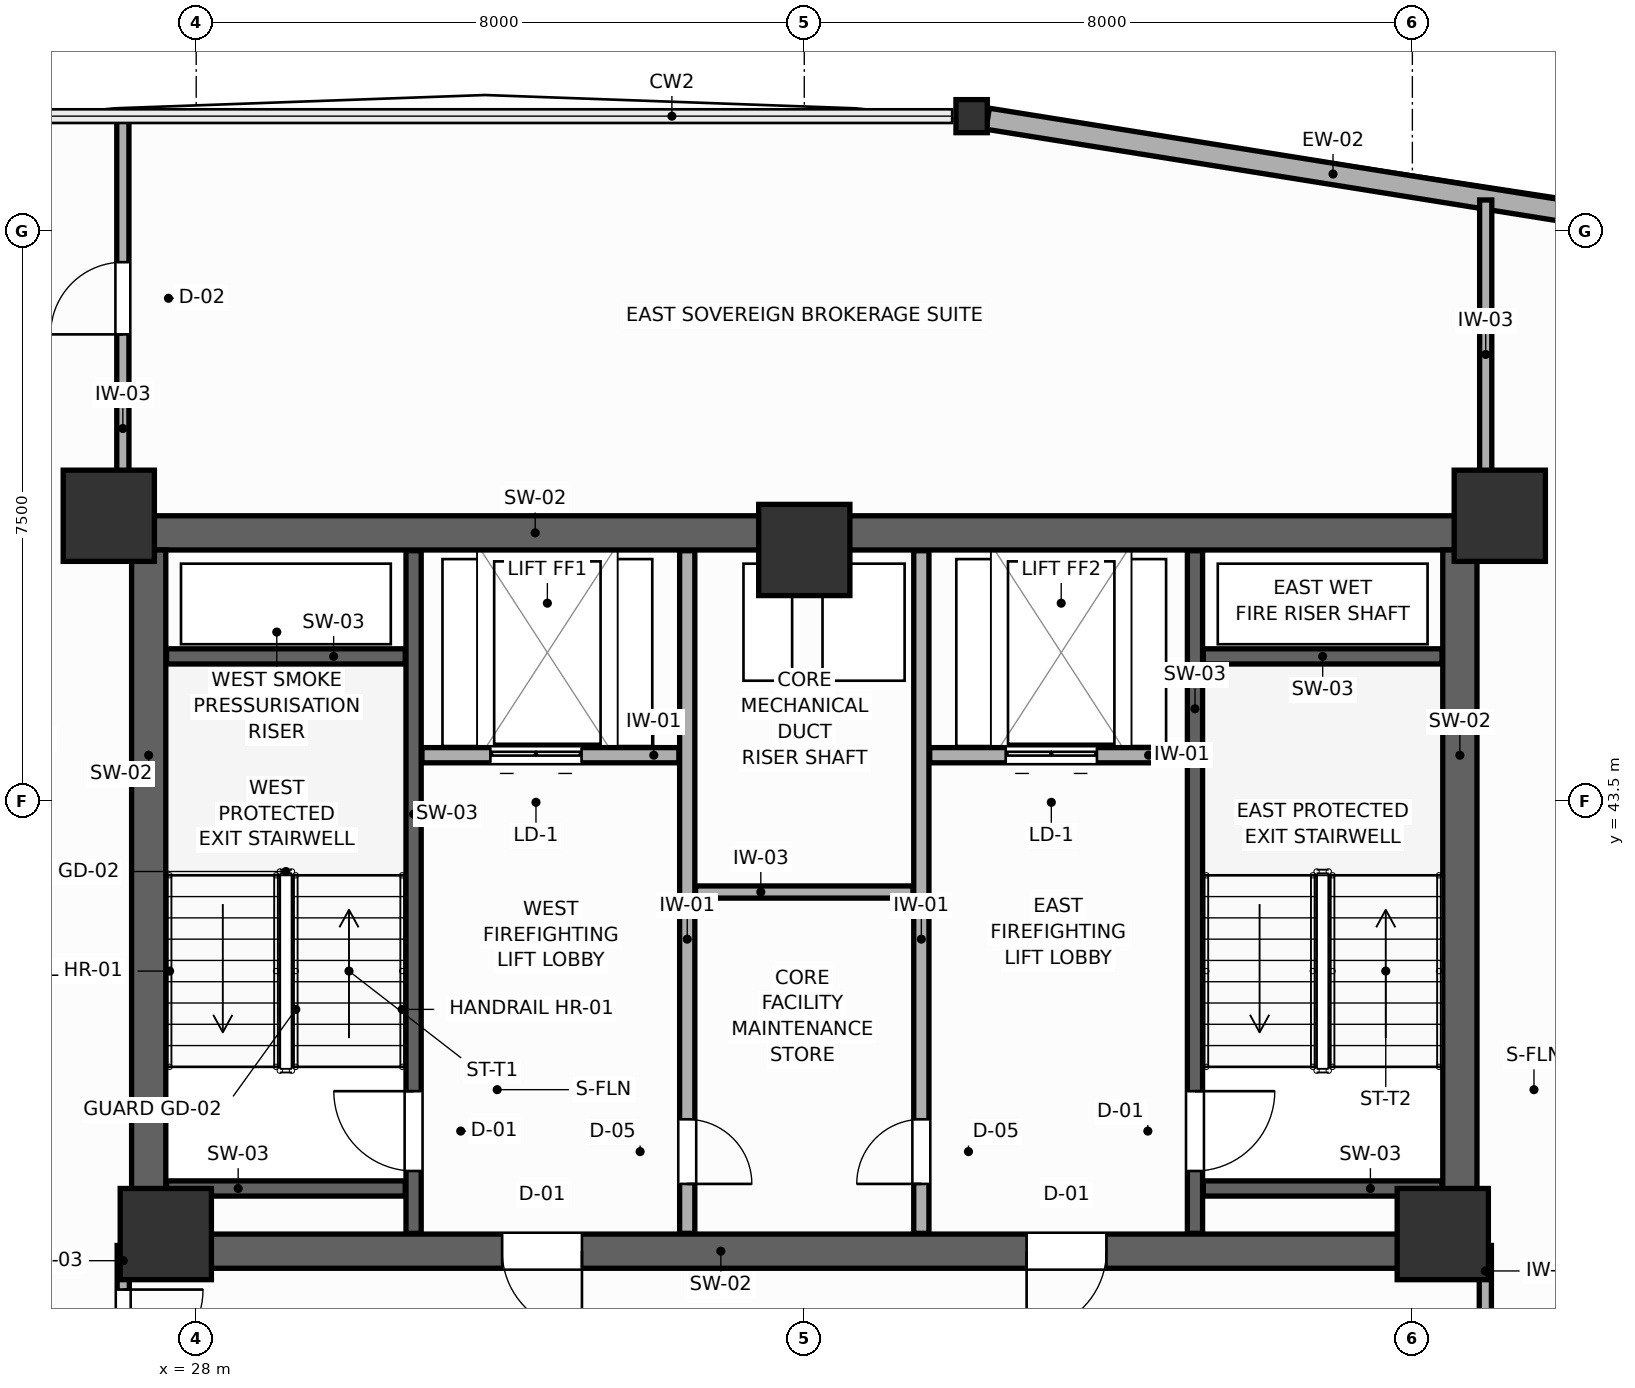
"""IFC4 building model, lengths in metres.
Left out: names, types, materials, properties, quantities, classifications, styles, units other than length and angle.
Written with IfcOpenShell. Run it as: python <this file> out.ifc"""

import sys

from ifc_helpers import new_model, si_unit, direction, frame, frame_2d, origin, origin_2d, place, context, subcontext, project, spatial, rectangle, i_section, extrude, source, transform, mapped, element, fill, save


model = new_model("IFC4")
c1 = context("Model", 3, precision=1e-05, world=origin(), true_north=direction((0.0, 1.0)))
c2 = subcontext(c1, "Body", "Model", "MODEL_VIEW")
j1 = project(units=[si_unit("LENGTHUNIT", "METRE"), si_unit("PLANEANGLEUNIT", "RADIAN")], contexts=[c1])
p1 = place(None, origin())
s1 = spatial("IfcSite", under=j1, at=p1, CompositionType="ELEMENT")
p2 = place(p1, origin())
s2 = spatial("IfcBuilding", under=s1, at=p2, CompositionType="ELEMENT")
p3 = place(p2, frame((0.0, 0.0, 161.4)))
s3 = spatial("IfcBuildingStorey", under=s2, at=p3, CompositionType="ELEMENT", Elevation=161.4)
p4 = place(p3, frame((27.15, 47.025, 0.0), z_axis=(0.0, 0.0, 1.0), x_axis=(1.0, 0.0, 0.0)))
e1 = element("IfcWall", 1, at=p4, inside=s3, PredefinedType="SHEAR", context=c2, shape_type="SweptSolid", body=[
    extrude(rectangle(XDim=17.7, YDim=0.45, at=frame_2d((8.85, 0.0))), origin(), (0.0, 0.0, 1.0), 3.6),
])
p5 = place(p3, frame((27.15, 37.575, 0.0), z_axis=(0.0, 0.0, 1.0), x_axis=(1.0, 0.0, 0.0)))
e2 = element("IfcWall", 2, at=p5, inside=s3, PredefinedType="SHEAR", context=c2, shape_type="SweptSolid", body=[
    extrude(rectangle(XDim=17.7, YDim=0.45, at=frame_2d((8.85, 0.0))), origin(), (0.0, 0.0, 1.0), 3.6),
])
p6 = place(p5, frame((4.875, 0.0, 0.0)))
e3 = element("IfcOpeningElement", 3, at=p6, cuts=e2, PredefinedType="OPENING", context=c2, shape_type="SweptSolid", body=[
    extrude(rectangle(XDim=1.05, YDim=2.1, at=frame_2d((0.525, 1.05))), frame((0.0, 0.235, 0.0), z_axis=(0.0, -1.0, 0.0), x_axis=(1.0, 0.0, 0.0)), (0.0, 0.0, 1.0), 0.47),
])
p7 = place(p5, frame((11.775, 0.0, 0.0)))
e4 = element("IfcOpeningElement", 4, at=p7, cuts=e2, PredefinedType="OPENING", context=c2, shape_type="SweptSolid", body=[
    extrude(rectangle(XDim=1.05, YDim=2.1, at=frame_2d((0.525, 1.05))), frame((0.0, 0.235, 0.0), z_axis=(0.0, -1.0, 0.0), x_axis=(1.0, 0.0, 0.0)), (0.0, 0.0, 1.0), 0.47),
])
for number, where, z_axis, x_axis in (
    (5, (27.375, 37.8, 0.0), (0.0, 0.0, 1.0), (0.0, 1.0, 0.0)),
    (6, (44.625, 37.8, 0.0), (0.0, 0.0, 1.0), (0.0, 1.0, 0.0)),
):
    element("IfcWall", number, at=place(p3, frame(where, z_axis=z_axis, x_axis=x_axis)), inside=s3, PredefinedType="SHEAR", context=c2, shape_type="SweptSolid", body=[
        extrude(rectangle(XDim=9.0, YDim=0.45, at=frame_2d((4.5, 0.0))), origin(), (0.0, 0.0, 1.0), 3.6),
    ])
m1 = source(origin(), c2, "Body", "SweptSolid", [
    extrude(rectangle(XDim=1.2, YDim=1.2, at=origin_2d()), origin(), (0.0, 0.0, 1.0), 3.6),
])
for number, where, z_axis, x_axis in (
    (7, (26.85, 47.25, 0.0), (0.0, 0.0, 1.0), (1.0, 0.0, 0.0)),
    (8, (45.15, 47.25, 0.0), (0.0, 0.0, 1.0), (1.0, 0.0, 0.0)),
    (9, (27.6, 37.8, 0.0), (0.0, 0.0, 1.0), (1.0, 0.0, 0.0)),
    (10, (44.4, 37.8, 0.0), (0.0, 0.0, 1.0), (1.0, 0.0, 0.0)),
    (11, (36.0, 46.8, 0.0), (0.0, 0.0, 1.0), (1.0, 0.0, 0.0)),
):
    element("IfcColumn", number, at=place(p3, frame(where, z_axis=z_axis, x_axis=x_axis)), inside=s3, PredefinedType="COLUMN", context=c2, shape_type="MappedRepresentation", body=[
        mapped(m1, transform((0.0, 0.0, 0.0), scale=1.0)),
    ])
m2 = source(origin(), c2, "Body", "SweptSolid", [
    extrude(i_section(OverallWidth=0.412, OverallDepth=0.435, WebThickness=0.033, FlangeThickness=0.053, FilletRadius=0.015, at=origin_2d()), origin(), (0.0, 0.0, 1.0), 3.6),
])
p8 = place(p3, frame((38.201, 52.508, 0.0), z_axis=(0.0, 0.0, 1.0), x_axis=(1.0, 0.0, 0.0)))
e12 = element("IfcColumn", 12, at=p8, inside=s3, PredefinedType="COLUMN", context=c2, shape_type="MappedRepresentation", body=[
    mapped(m2, transform((0.0, 0.0, 0.0), scale=1.0)),
])
p9 = place(p3, frame((52.708, 50.185, 0.0), z_axis=(0.0, 0.0, 1.0), x_axis=(-0.98742305143, 0.158100339991, 0.0)))
e13 = element("IfcWall", 13, at=p9, inside=s3, PredefinedType="SOLIDWALL", context=c2, shape_type="SweptSolid", body=[
    extrude(rectangle(XDim=14.477, YDim=0.28, at=frame_2d((7.239, 0.0))), origin(), (0.0, 0.0, 1.0), 3.0),
])
p10 = place(p9, frame((3.394, 0.0, 0.75)))
e14 = element("IfcOpeningElement", 14, at=p10, cuts=e13, PredefinedType="OPENING", context=c2, shape_type="SweptSolid", body=[
    extrude(rectangle(XDim=1.7, YDim=1.75, at=frame_2d((0.85, 0.875))), frame((0.0, 0.15, 0.0), z_axis=(0.0, -1.0, 0.0), x_axis=(1.0, 0.0, 0.0)), (0.0, 0.0, 1.0), 0.3),
])
p11 = place(p3, frame((30.86, 37.81, 0.0), z_axis=(0.0, 0.0, 1.0), x_axis=(0.0, 1.0, 0.0)))
e15 = element("IfcWall", 15, at=p11, inside=s3, PredefinedType="SHEAR", context=c2, shape_type="SweptSolid", body=[
    extrude(rectangle(XDim=8.98, YDim=0.2, at=frame_2d((4.49, 0.0))), origin(), (0.0, 0.0, 1.0), 3.6),
])
p12 = place(p11, frame((0.82, 0.0, 0.0)))
e16 = element("IfcOpeningElement", 16, at=p12, cuts=e15, PredefinedType="OPENING", context=c2, shape_type="SweptSolid", body=[
    extrude(rectangle(XDim=1.05, YDim=2.1, at=frame_2d((0.525, 1.05))), frame((0.0, 0.11, 0.0), z_axis=(0.0, -1.0, 0.0), x_axis=(1.0, 0.0, 0.0)), (0.0, 0.0, 1.0), 0.22),
])
for number, where, z_axis, x_axis in (
    (17, (27.61, 45.4, 0.0), (0.0, 0.0, 1.0), (1.0, 0.0, 0.0)),
    (18, (27.61, 38.4, 0.0), (0.0, 0.0, 1.0), (1.0, 0.0, 0.0)),
):
    element("IfcWall", number, at=place(p3, frame(where, z_axis=z_axis, x_axis=x_axis)), inside=s3, PredefinedType="SHEAR", context=c2, shape_type="SweptSolid", body=[
        extrude(rectangle(XDim=3.14, YDim=0.2, at=frame_2d((1.57, 0.0))), origin(), (0.0, 0.0, 1.0), 3.6),
    ])
p13 = place(p3, frame((41.14, 37.81, 0.0), z_axis=(0.0, 0.0, 1.0), x_axis=(0.0, 1.0, 0.0)))
e19 = element("IfcWall", 19, at=p13, inside=s3, PredefinedType="SHEAR", context=c2, shape_type="SweptSolid", body=[
    extrude(rectangle(XDim=8.98, YDim=0.2, at=frame_2d((4.49, 0.0))), origin(), (0.0, 0.0, 1.0), 3.6),
])
p14 = place(p13, frame((0.82, 0.0, 0.0)))
e20 = element("IfcOpeningElement", 20, at=p14, cuts=e19, PredefinedType="OPENING", context=c2, shape_type="SweptSolid", body=[
    extrude(rectangle(XDim=1.05, YDim=2.1, at=frame_2d((0.525, 1.05))), frame((0.0, 0.11, 0.0), z_axis=(0.0, -1.0, 0.0), x_axis=(1.0, 0.0, 0.0)), (0.0, 0.0, 1.0), 0.22),
])
for number, where, z_axis, x_axis in (
    (21, (41.25, 45.4, 0.0), (0.0, 0.0, 1.0), (1.0, 0.0, 0.0)),
    (22, (41.25, 38.4, 0.0), (0.0, 0.0, 1.0), (1.0, 0.0, 0.0)),
):
    element("IfcWall", number, at=place(p3, frame(where, z_axis=z_axis, x_axis=x_axis)), inside=s3, PredefinedType="SHEAR", context=c2, shape_type="SweptSolid", body=[
        extrude(rectangle(XDim=3.14, YDim=0.2, at=frame_2d((1.57, 0.0))), origin(), (0.0, 0.0, 1.0), 3.6),
    ])
p15 = place(p3, frame((30.97, 44.1, 0.0), z_axis=(0.0, 0.0, 1.0), x_axis=(1.0, 0.0, 0.0)))
e23 = element("IfcWall", 23, at=p15, inside=s3, PredefinedType="PARTITIONING", context=c2, shape_type="SweptSolid", body=[
    extrude(rectangle(XDim=3.38, YDim=0.2, at=frame_2d((1.69, 0.0))), origin(), (0.0, 0.0, 1.0), 3.4),
])
p16 = place(p15, frame((0.9, 0.0, 0.0)))
e24 = element("IfcOpeningElement", 24, at=p16, cuts=e23, PredefinedType="OPENING", context=c2, shape_type="SweptSolid", body=[
    extrude(rectangle(XDim=1.2, YDim=2.1, at=frame_2d((0.6, 1.05))), frame((0.0, 0.11, 0.0), z_axis=(0.0, -1.0, 0.0), x_axis=(1.0, 0.0, 0.0)), (0.0, 0.0, 1.0), 0.22),
])
p17 = place(p3, frame((37.65, 44.1, 0.0), z_axis=(0.0, 0.0, 1.0), x_axis=(1.0, 0.0, 0.0)))
e25 = element("IfcWall", 25, at=p17, inside=s3, PredefinedType="PARTITIONING", context=c2, shape_type="SweptSolid", body=[
    extrude(rectangle(XDim=3.38, YDim=0.2, at=frame_2d((1.69, 0.0))), origin(), (0.0, 0.0, 1.0), 3.4),
])
p18 = place(p17, frame((1.0, 0.0, 0.0)))
e26 = element("IfcOpeningElement", 26, at=p18, cuts=e25, PredefinedType="OPENING", context=c2, shape_type="SweptSolid", body=[
    extrude(rectangle(XDim=1.2, YDim=2.1, at=frame_2d((0.6, 1.05))), frame((0.0, 0.11, 0.0), z_axis=(0.0, -1.0, 0.0), x_axis=(1.0, 0.0, 0.0)), (0.0, 0.0, 1.0), 0.22),
])
p19 = place(p3, frame((34.46, 37.81, 0.0), z_axis=(0.0, 0.0, 1.0), x_axis=(0.0, 1.0, 0.0)))
e27 = element("IfcWall", 27, at=p19, inside=s3, PredefinedType="PARTITIONING", context=c2, shape_type="SweptSolid", body=[
    extrude(rectangle(XDim=8.98, YDim=0.2, at=frame_2d((4.49, 0.0))), origin(), (0.0, 0.0, 1.0), 3.4),
])
p20 = place(p19, frame((0.65, 0.0, 0.0)))
e28 = element("IfcOpeningElement", 28, at=p20, cuts=e27, PredefinedType="OPENING", context=c2, shape_type="SweptSolid", body=[
    extrude(rectangle(XDim=0.85, YDim=2.05, at=frame_2d((0.425, 1.025))), frame((0.0, 0.11, 0.0), z_axis=(0.0, -1.0, 0.0), x_axis=(1.0, 0.0, 0.0)), (0.0, 0.0, 1.0), 0.22),
])
p21 = place(p3, frame((37.54, 37.81, 0.0), z_axis=(0.0, 0.0, 1.0), x_axis=(0.0, 1.0, 0.0)))
e29 = element("IfcWall", 29, at=p21, inside=s3, PredefinedType="PARTITIONING", context=c2, shape_type="SweptSolid", body=[
    extrude(rectangle(XDim=8.98, YDim=0.2, at=frame_2d((4.49, 0.0))), origin(), (0.0, 0.0, 1.0), 3.4),
])
p22 = place(p21, frame((0.65, 0.0, 0.0)))
e30 = element("IfcOpeningElement", 30, at=p22, cuts=e29, PredefinedType="OPENING", context=c2, shape_type="SweptSolid", body=[
    extrude(rectangle(XDim=0.85, YDim=2.05, at=frame_2d((0.425, 1.025))), frame((0.0, 0.11, 0.0), z_axis=(0.0, -1.0, 0.0), x_axis=(1.0, 0.0, 0.0)), (0.0, 0.0, 1.0), 0.22),
])
p23 = place(p3, frame((34.57, 42.3, 0.0), z_axis=(0.0, 0.0, 1.0), x_axis=(1.0, 0.0, 0.0)))
e31 = element("IfcWall", 31, at=p23, inside=s3, PredefinedType="PARTITIONING", context=c2, shape_type="SweptSolid", body=[
    extrude(rectangle(XDim=2.86, YDim=0.16, at=frame_2d((1.43, 0.0))), origin(), (0.0, 0.0, 1.0), 3.4),
])
p24 = place(p3, frame((27.04, 35.54, 0.0), z_axis=(0.0, 0.0, 1.0), x_axis=(0.0, 1.0, 0.0)))
e32 = element("IfcWall", 32, at=p24, inside=s3, PredefinedType="PARTITIONING", context=c2, shape_type="SweptSolid", body=[
    extrude(rectangle(XDim=2.11, YDim=0.16, at=frame_2d((1.055, 0.0))), origin(), (0.0, 0.0, 1.0), 3.4),
])
p25 = place(p24, frame((0.48, 0.0, 0.0)))
e33 = element("IfcOpeningElement", 33, at=p25, cuts=e32, PredefinedType="OPENING", context=c2, shape_type="SweptSolid", body=[
    extrude(rectangle(XDim=1.05, YDim=2.1, at=frame_2d((0.525, 1.05))), frame((0.0, 0.09, 0.0), z_axis=(0.0, -1.0, 0.0), x_axis=(1.0, 0.0, 0.0)), (0.0, 0.0, 1.0), 0.18),
])
p26 = place(p3, frame((44.96, 35.0, 0.0), z_axis=(0.0, 0.0, 1.0), x_axis=(0.0, 1.0, 0.0)))
e34 = element("IfcWall", 34, at=p26, inside=s3, PredefinedType="PARTITIONING", context=c2, shape_type="SweptSolid", body=[
    extrude(rectangle(XDim=2.65, YDim=0.16, at=frame_2d((1.325, 0.0))), origin(), (0.0, 0.0, 1.0), 3.4),
])
p27 = place(p26, frame((0.75, 0.0, 0.0)))
e35 = element("IfcOpeningElement", 35, at=p27, cuts=e34, PredefinedType="OPENING", context=c2, shape_type="SweptSolid", body=[
    extrude(rectangle(XDim=1.05, YDim=2.1, at=frame_2d((0.525, 1.05))), frame((0.0, 0.09, 0.0), z_axis=(0.0, -1.0, 0.0), x_axis=(1.0, 0.0, 0.0)), (0.0, 0.0, 1.0), 0.18),
])
p28 = place(p3, frame((27.035, 47.34, 0.0), z_axis=(0.0, 0.0, 1.0), x_axis=(0.0, 1.0, 0.0)))
e36 = element("IfcWall", 36, at=p28, inside=s3, PredefinedType="PARTITIONING", context=c2, shape_type="SweptSolid", body=[
    extrude(rectangle(XDim=5.147, YDim=0.16, at=frame_2d((2.574, 0.0))), origin(), (0.0, 0.0, 1.0), 3.4),
])
p29 = place(p28, frame((2.296, 0.0, 0.0)))
e37 = element("IfcOpeningElement", 37, at=p29, cuts=e36, PredefinedType="OPENING", context=c2, shape_type="SweptSolid", body=[
    extrude(rectangle(XDim=0.95, YDim=2.05, at=frame_2d((0.475, 1.025))), frame((0.0, 0.09, 0.0), z_axis=(0.0, -1.0, 0.0), x_axis=(1.0, 0.0, 0.0)), (0.0, 0.0, 1.0), 0.18),
])
p30 = place(p3, frame((44.965, 47.34, 0.0), z_axis=(0.0, 0.0, 1.0), x_axis=(0.0, 1.0, 0.0)))
e38 = element("IfcWall", 38, at=p30, inside=s3, PredefinedType="PARTITIONING", context=c2, shape_type="SweptSolid", body=[
    extrude(rectangle(XDim=4.064, YDim=0.16, at=frame_2d((2.032, 0.0))), origin(), (0.0, 0.0, 1.0), 3.4),
])
p31 = place(p12, origin())
e39 = element("IfcDoor", 39, at=p31, inside=s3, OperationType="SINGLE_SWING_RIGHT", PredefinedType="DOOR", context=c2, shape_type="SweptSolid", body=[
    extrude(rectangle(XDim=1.05, YDim=2.1, at=frame_2d((0.525, 1.05))), frame((0.0, 0.025, 0.0), z_axis=(0.0, -1.0, 0.0), x_axis=(1.0, 0.0, 0.0)), (0.0, 0.0, 1.0), 0.05),
])
fill(e16, e39)
p32 = place(p14, frame((1.05, 0.0, 0.0), z_axis=(0.0, 0.0, 1.0), x_axis=(-1.0, 0.0, 0.0)))
e40 = element("IfcDoor", 40, at=p32, inside=s3, OperationType="SINGLE_SWING_LEFT", PredefinedType="DOOR", context=c2, shape_type="SweptSolid", body=[
    extrude(rectangle(XDim=1.05, YDim=2.1, at=frame_2d((0.525, 1.05))), frame((0.0, 0.025, 0.0), z_axis=(0.0, -1.0, 0.0), x_axis=(1.0, 0.0, 0.0)), (0.0, 0.0, 1.0), 0.05),
])
fill(e20, e40)
p33 = place(p16, origin())
e41 = element("IfcDoor", 41, at=p33, inside=s3, OperationType="DOUBLE_DOOR_SLIDING", PredefinedType="DOOR", context=c2, shape_type="SweptSolid", body=[
    extrude(rectangle(XDim=1.2, YDim=2.1, at=frame_2d((0.6, 1.05))), frame((0.0, 0.025, 0.0), z_axis=(0.0, -1.0, 0.0), x_axis=(1.0, 0.0, 0.0)), (0.0, 0.0, 1.0), 0.05),
])
fill(e24, e41)
p34 = place(p18, origin())
e42 = element("IfcDoor", 42, at=p34, inside=s3, OperationType="DOUBLE_DOOR_SLIDING", PredefinedType="DOOR", context=c2, shape_type="SweptSolid", body=[
    extrude(rectangle(XDim=1.2, YDim=2.1, at=frame_2d((0.6, 1.05))), frame((0.0, 0.025, 0.0), z_axis=(0.0, -1.0, 0.0), x_axis=(1.0, 0.0, 0.0)), (0.0, 0.0, 1.0), 0.05),
])
fill(e26, e42)
p35 = place(p20, frame((0.85, 0.0, 0.0), z_axis=(0.0, 0.0, 1.0), x_axis=(-1.0, 0.0, 0.0)))
e43 = element("IfcDoor", 43, at=p35, inside=s3, OperationType="SINGLE_SWING_RIGHT", PredefinedType="DOOR", context=c2, shape_type="SweptSolid", body=[
    extrude(rectangle(XDim=0.85, YDim=2.05, at=frame_2d((0.425, 1.025))), frame((0.0, 0.025, 0.0), z_axis=(0.0, -1.0, 0.0), x_axis=(1.0, 0.0, 0.0)), (0.0, 0.0, 1.0), 0.05),
])
fill(e28, e43)
p36 = place(p22, origin())
e44 = element("IfcDoor", 44, at=p36, inside=s3, OperationType="SINGLE_SWING_LEFT", PredefinedType="DOOR", context=c2, shape_type="SweptSolid", body=[
    extrude(rectangle(XDim=0.85, YDim=2.05, at=frame_2d((0.425, 1.025))), frame((0.0, 0.025, 0.0), z_axis=(0.0, -1.0, 0.0), x_axis=(1.0, 0.0, 0.0)), (0.0, 0.0, 1.0), 0.05),
])
fill(e30, e44)
p37 = place(p25, frame((1.05, 0.0, 0.0), z_axis=(0.0, 0.0, 1.0), x_axis=(-1.0, 0.0, 0.0)))
e45 = element("IfcDoor", 45, at=p37, inside=s3, OperationType="SINGLE_SWING_LEFT", PredefinedType="DOOR", context=c2, shape_type="SweptSolid", body=[
    extrude(rectangle(XDim=1.05, YDim=2.1, at=frame_2d((0.525, 1.05))), frame((0.0, 0.025, 0.0), z_axis=(0.0, -1.0, 0.0), x_axis=(1.0, 0.0, 0.0)), (0.0, 0.0, 1.0), 0.05),
])
fill(e33, e45)
p38 = place(p29, origin())
e46 = element("IfcDoor", 46, at=p38, inside=s3, OperationType="SINGLE_SWING_LEFT", PredefinedType="DOOR", context=c2, shape_type="SweptSolid", body=[
    extrude(rectangle(XDim=0.95, YDim=2.05, at=frame_2d((0.475, 1.025))), frame((0.0, 0.025, 0.0), z_axis=(0.0, -1.0, 0.0), x_axis=(1.0, 0.0, 0.0)), (0.0, 0.0, 1.0), 0.05),
])
fill(e37, e46)
p39 = place(p6, frame((1.05, 0.0, 0.0), z_axis=(0.0, 0.0, 1.0), x_axis=(-1.0, 0.0, 0.0)))
e47 = element("IfcDoor", 47, at=p39, inside=s3, OperationType="SINGLE_SWING_LEFT", PredefinedType="DOOR", context=c2, shape_type="SweptSolid", body=[
    extrude(rectangle(XDim=1.05, YDim=2.1, at=frame_2d((0.525, 1.05))), frame((0.0, 0.025, 0.0), z_axis=(0.0, -1.0, 0.0), x_axis=(1.0, 0.0, 0.0)), (0.0, 0.0, 1.0), 0.05),
])
fill(e3, e47)
p40 = place(p7, frame((1.05, 0.0, 0.0), z_axis=(0.0, 0.0, 1.0), x_axis=(-1.0, 0.0, 0.0)))
e48 = element("IfcDoor", 48, at=p40, inside=s3, OperationType="SINGLE_SWING_RIGHT", PredefinedType="DOOR", context=c2, shape_type="SweptSolid", body=[
    extrude(rectangle(XDim=1.05, YDim=2.1, at=frame_2d((0.525, 1.05))), frame((0.0, 0.025, 0.0), z_axis=(0.0, -1.0, 0.0), x_axis=(1.0, 0.0, 0.0)), (0.0, 0.0, 1.0), 0.05),
])
fill(e4, e48)
save(model, sys.argv[1])
